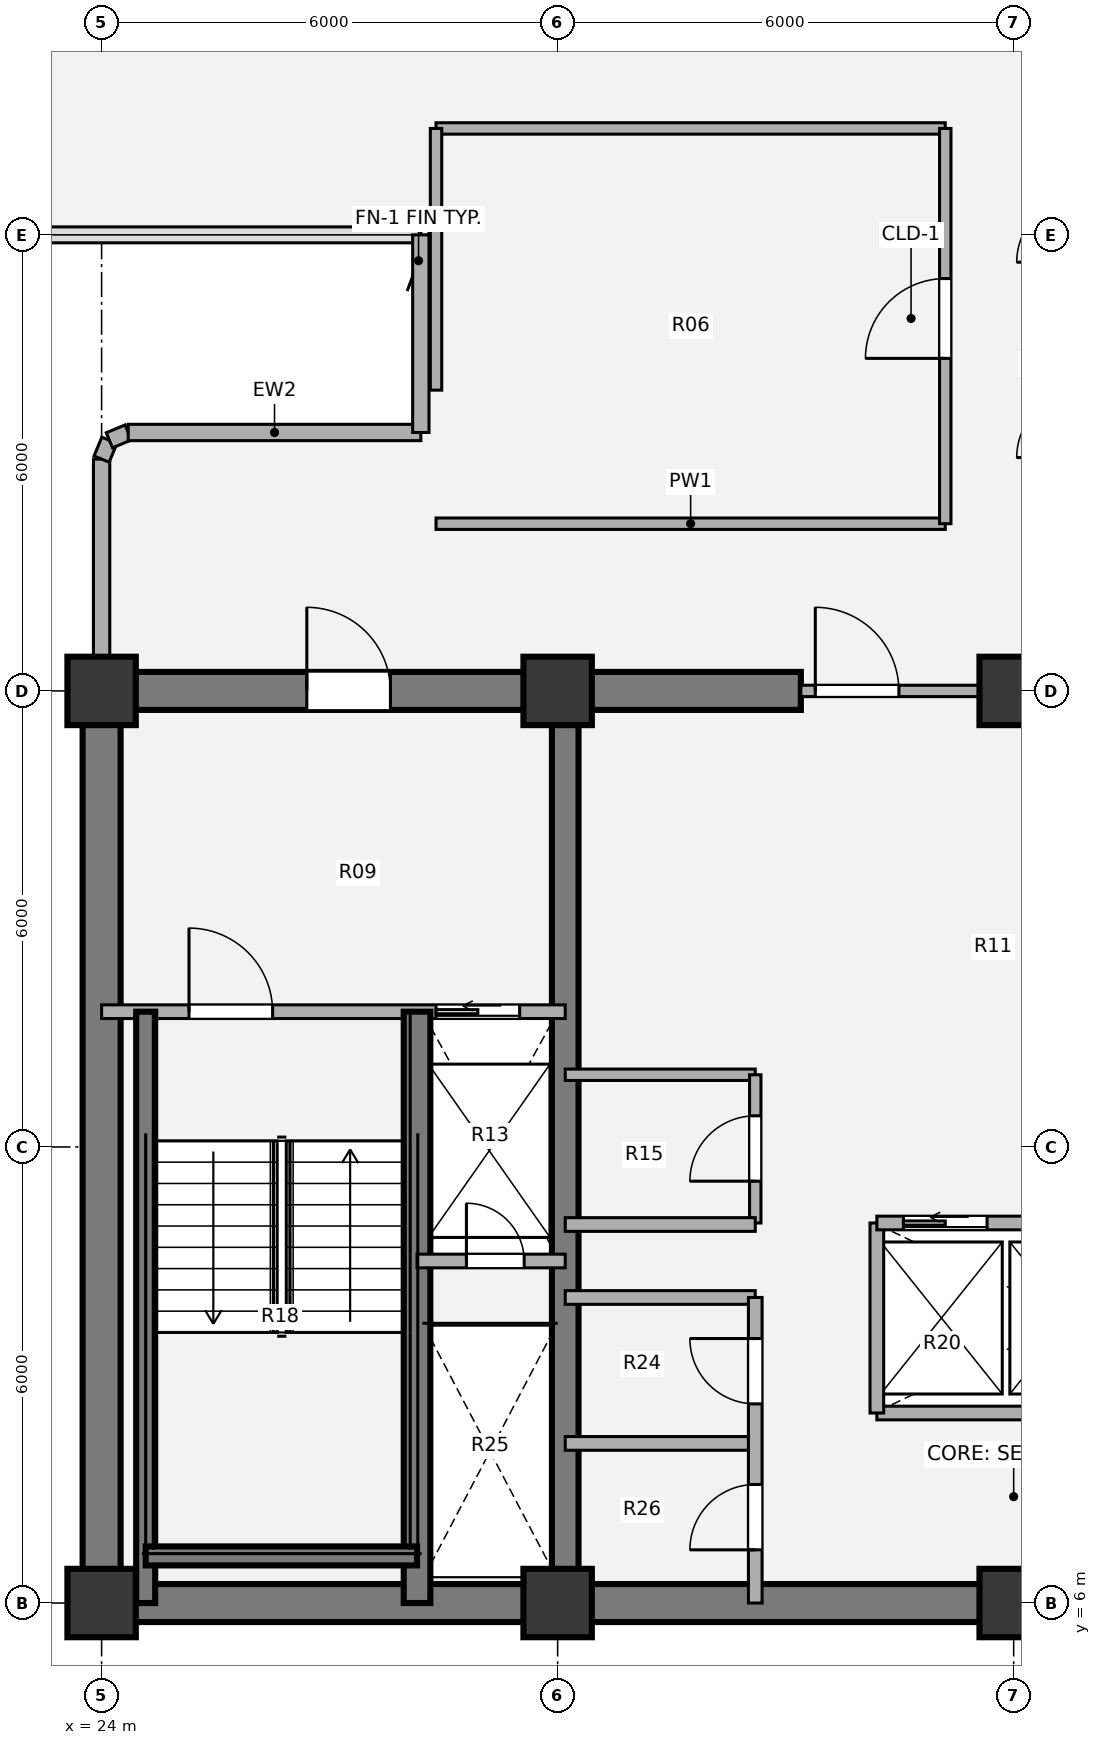
"""IFC4 building model, lengths in metres.
Left out: names, types, materials, properties, quantities, classifications, styles, units other than length and angle.
Written with IfcOpenShell. Run it as: python <this file> out.ifc"""

import sys

from ifc_helpers import new_model, si_unit, direction, frame, frame_2d, origin, origin_2d, place, context, subcontext, project, spatial, rectangle, extrude, source, transform, mapped, element, fill, save


model = new_model("IFC4")
c1 = context("Model", 3, precision=1e-05, world=origin(), true_north=direction((0.0, 1.0)))
c2 = subcontext(c1, "Body", "Model", "MODEL_VIEW")
j1 = project(units=[si_unit("LENGTHUNIT", "METRE"), si_unit("PLANEANGLEUNIT", "RADIAN")], contexts=[c1])
p1 = place(None, origin())
s1 = spatial("IfcSite", under=j1, at=p1, CompositionType="ELEMENT")
p2 = place(p1, origin())
s2 = spatial("IfcBuilding", under=s1, at=p2, CompositionType="ELEMENT")
p3 = place(p2, frame((0.0, 0.0, 120.06)))
s3 = spatial("IfcBuildingStorey", under=s2, at=p3, CompositionType="ELEMENT", Elevation=120.06)
m1 = source(origin(), c2, "Body", "SweptSolid", [
    extrude(rectangle(XDim=0.9, YDim=0.9, at=origin_2d()), origin(), (0.0, 0.0, 1.0), 3.78),
])
for number, where, z_axis, x_axis in (
    (1, (24.0, 6.0, 0.0), (0.0, 0.0, 1.0), (1.0, 0.0, 0.0)),
    (2, (30.0, 6.0, 0.0), (0.0, 0.0, 1.0), (1.0, 0.0, 0.0)),
    (3, (36.0, 6.0, 0.0), (0.0, 0.0, 1.0), (1.0, 0.0, 0.0)),
    (4, (24.0, 18.0, 0.0), (0.0, 0.0, 1.0), (1.0, 0.0, 0.0)),
    (5, (30.0, 18.0, 0.0), (0.0, 0.0, 1.0), (1.0, 0.0, 0.0)),
    (6, (36.0, 18.0, 0.0), (0.0, 0.0, 1.0), (1.0, 0.0, 0.0)),
):
    element("IfcColumn", number, at=place(p3, frame(where, z_axis=z_axis, x_axis=x_axis)), inside=s3, PredefinedType="COLUMN", context=c2, shape_type="MappedRepresentation", body=[
        mapped(m1, transform((0.0, 0.0, 0.0), x_axis=(1.0, 0.0, 0.0), y_axis=(0.0, 1.0, 0.0), z_axis=(0.0, 0.0, 1.0), scale=1.0)),
    ])
p4 = place(p3, frame((48.25, 6.0, 0.0), z_axis=(0.0, 0.0, 1.0), x_axis=(-1.0, 0.0, 0.0)))
e7 = element("IfcWall", 7, at=p4, inside=s3, PredefinedType="SHEAR", context=c2, shape_type="SweptSolid", body=[
    extrude(rectangle(XDim=24.5, YDim=0.5, at=frame_2d((12.25, 0.0))), origin(), (0.0, 0.0, 1.0), 3.78),
])
p5 = place(p3, frame((24.0, 6.0, 0.0), z_axis=(0.0, 0.0, 1.0), x_axis=(0.0, 1.0, 0.0)))
e8 = element("IfcWall", 8, at=p5, inside=s3, PredefinedType="SHEAR", context=c2, shape_type="SweptSolid", body=[
    extrude(rectangle(XDim=12.0, YDim=0.5, at=frame_2d((6.0, 0.0))), origin(), (0.0, 0.0, 1.0), 3.78),
])
p6 = place(p3, frame((23.75, 18.0, 0.0), z_axis=(0.0, 0.0, 1.0), x_axis=(1.0, 0.0, 0.0)))
e9 = element("IfcWall", 9, at=p6, inside=s3, PredefinedType="SHEAR", context=c2, shape_type="SweptSolid", body=[
    extrude(rectangle(XDim=9.45, YDim=0.5, at=frame_2d((4.725, 0.0))), origin(), (0.0, 0.0, 1.0), 3.78),
])
p7 = place(p6, frame((2.95, 0.0, 0.0)))
e10 = element("IfcOpeningElement", 10, at=p7, cuts=e9, PredefinedType="OPENING", context=c2, shape_type="SweptSolid", body=[
    extrude(rectangle(XDim=1.1, YDim=2.1, at=origin_2d()), frame((0.55, 0.26, 1.05), z_axis=(0.0, -1.0, 0.0), x_axis=(1.0, 0.0, 0.0)), (0.0, 0.0, 1.0), 0.52),
])
p8 = place(p3, frame((30.1, 6.0, 0.0), z_axis=(0.0, 0.0, 1.0), x_axis=(0.0, 1.0, 0.0)))
e11 = element("IfcWall", 11, at=p8, inside=s3, PredefinedType="SHEAR", context=c2, shape_type="SweptSolid", body=[
    extrude(rectangle(XDim=12.0, YDim=0.35, at=frame_2d((6.0, 0.0))), origin(), (0.0, 0.0, 1.0), 3.78),
])
p9 = place(p3, frame((24.0, 18.43, 0.0), z_axis=(0.0, 0.0, 1.0), x_axis=(0.0, 1.0, 0.0)))
e12 = element("IfcWall", 12, at=p9, inside=s3, PredefinedType="SOLIDWALL", context=c2, shape_type="SweptSolid", body=[
    extrude(rectangle(XDim=2.62, YDim=0.215, at=frame_2d((1.31, 0.0))), origin(), (0.0, 0.0, 1.0), 3.53),
])
p10 = place(p3, frame((24.0, 21.05, 0.0), z_axis=(0.0, 0.0, 1.0), x_axis=(0.382673670509, 0.923883575944, 0.0)))
e13 = element("IfcWall", 13, at=p10, inside=s3, PredefinedType="SOLIDWALL", context=c2, shape_type="SweptSolid", body=[
    extrude(rectangle(XDim=0.268, YDim=0.215, at=frame_2d((0.134, 0.0))), origin(), (0.0, 0.0, 1.0), 3.53),
])
p11 = place(p3, frame((24.103, 21.298, 0.0), z_axis=(0.0, 0.0, 1.0), x_axis=(0.924205486139, 0.381895560841, 0.0)))
e14 = element("IfcWall", 14, at=p11, inside=s3, PredefinedType="SOLIDWALL", context=c2, shape_type="SweptSolid", body=[
    extrude(rectangle(XDim=0.268, YDim=0.215, at=frame_2d((0.134, 0.0))), origin(), (0.0, 0.0, 1.0), 3.53),
])
p12 = place(p3, frame((24.35, 21.4, 0.0), z_axis=(0.0, 0.0, 1.0), x_axis=(1.0, 0.0, 0.0)))
e15 = element("IfcWall", 15, at=p12, inside=s3, PredefinedType="SOLIDWALL", context=c2, shape_type="SweptSolid", body=[
    extrude(rectangle(XDim=3.85, YDim=0.215, at=frame_2d((1.925, 0.0))), origin(), (0.0, 0.0, 1.0), 3.53),
])
p13 = place(p3, frame((28.2, 21.4, 0.0), z_axis=(0.0, 0.0, 1.0), x_axis=(0.0, 1.0, 0.0)))
e16 = element("IfcWall", 16, at=p13, inside=s3, PredefinedType="SOLIDWALL", context=c2, shape_type="SweptSolid", body=[
    extrude(rectangle(XDim=2.6, YDim=0.215, at=frame_2d((1.3, 0.0))), origin(), (0.0, 0.0, 1.0), 3.53),
])
p14 = place(p3, frame((30.1, 12.95, 0.0), z_axis=(0.0, 0.0, 1.0), x_axis=(1.0, 0.0, 0.0)))
e17 = element("IfcWall", 17, at=p14, inside=s3, PredefinedType="PARTITIONING", context=c2, shape_type="SweptSolid", body=[
    extrude(rectangle(XDim=2.5, YDim=0.15, at=frame_2d((1.25, 0.0))), origin(), (0.0, 0.0, 1.0), 3.5),
])
p15 = place(p3, frame((32.6, 11.0, 0.0), z_axis=(0.0, 0.0, 1.0), x_axis=(0.0, 1.0, 0.0)))
e18 = element("IfcWall", 18, at=p15, inside=s3, PredefinedType="PARTITIONING", context=c2, shape_type="SweptSolid", body=[
    extrude(rectangle(XDim=1.95, YDim=0.15, at=frame_2d((0.975, 0.0))), origin(), (0.0, 0.0, 1.0), 3.5),
])
p16 = place(p15, frame((0.55, 0.0, 0.0)))
e19 = element("IfcOpeningElement", 19, at=p16, cuts=e18, PredefinedType="OPENING", context=c2, shape_type="SweptSolid", body=[
    extrude(rectangle(XDim=0.86, YDim=2.1, at=origin_2d()), frame((0.43, 0.085, 1.05), z_axis=(0.0, -1.0, 0.0), x_axis=(1.0, 0.0, 0.0)), (0.0, 0.0, 1.0), 0.17),
])
p17 = place(p3, frame((34.2, 8.5, 0.0), z_axis=(0.0, 0.0, 1.0), x_axis=(1.0, 0.0, 0.0)))
e20 = element("IfcWall", 20, at=p17, inside=s3, PredefinedType="PARTITIONING", context=c2, shape_type="SweptSolid", body=[
    extrude(rectangle(XDim=5.15, YDim=0.18, at=frame_2d((2.575, 0.0))), origin(), (0.0, 0.0, 1.0), 3.5),
])
for number, where, z_axis, x_axis in (
    (21, (34.2, 8.5, 0.0), (0.0, 0.0, 1.0), (0.0, 1.0, 0.0)),
    (22, (30.1, 10.98, 0.0), (0.0, 0.0, 1.0), (1.0, 0.0, 0.0)),
    (23, (30.1, 8.1, 0.0), (0.0, 0.0, 1.0), (1.0, 0.0, 0.0)),
    (24, (30.1, 10.02, 0.0), (0.0, 0.0, 1.0), (1.0, 0.0, 0.0)),
):
    element("IfcWall", number, at=place(p3, frame(where, z_axis=z_axis, x_axis=x_axis)), inside=s3, PredefinedType="PARTITIONING", context=c2, shape_type="SweptSolid", body=[
        extrude(rectangle(XDim=2.5, YDim=0.18, at=frame_2d((1.25, 0.0))), origin(), (0.0, 0.0, 1.0), 3.5),
    ])
p18 = place(p3, frame((32.6, 6.0, 0.0), z_axis=(0.0, 0.0, 1.0), x_axis=(0.0, 1.0, 0.0)))
e25 = element("IfcWall", 25, at=p18, inside=s3, PredefinedType="PARTITIONING", context=c2, shape_type="SweptSolid", body=[
    extrude(rectangle(XDim=4.02, YDim=0.18, at=frame_2d((2.01, 0.0))), origin(), (0.0, 0.0, 1.0), 3.5),
])
p19 = place(p18, frame((0.7, 0.0, 0.0)))
e26 = element("IfcOpeningElement", 26, at=p19, cuts=e25, PredefinedType="OPENING", context=c2, shape_type="SweptSolid", body=[
    extrude(rectangle(XDim=0.86, YDim=2.1, at=origin_2d()), frame((0.43, 0.1, 1.05), z_axis=(0.0, -1.0, 0.0), x_axis=(1.0, 0.0, 0.0)), (0.0, 0.0, 1.0), 0.2),
])
p20 = place(p18, frame((2.62, 0.0, 0.0)))
e27 = element("IfcOpeningElement", 27, at=p20, cuts=e25, PredefinedType="OPENING", context=c2, shape_type="SweptSolid", body=[
    extrude(rectangle(XDim=0.86, YDim=2.1, at=origin_2d()), frame((0.43, 0.1, 1.05), z_axis=(0.0, -1.0, 0.0), x_axis=(1.0, 0.0, 0.0)), (0.0, 0.0, 1.0), 0.2),
])
p21 = place(p3, frame((33.2, 18.0, 0.0), z_axis=(0.0, 0.0, 1.0), x_axis=(1.0, 0.0, 0.0)))
e28 = element("IfcWall", 28, at=p21, inside=s3, PredefinedType="PARTITIONING", context=c2, shape_type="SweptSolid", body=[
    extrude(rectangle(XDim=5.6, YDim=0.15, at=frame_2d((2.8, 0.0))), origin(), (0.0, 0.0, 1.0), 2.315),
])
p22 = place(p21, frame((0.19, 0.0, 0.0)))
e29 = element("IfcOpeningElement", 29, at=p22, cuts=e28, PredefinedType="OPENING", context=c2, shape_type="SweptSolid", body=[
    extrude(rectangle(XDim=1.1, YDim=2.1, at=origin_2d()), frame((0.55, 0.085, 1.05), z_axis=(0.0, -1.0, 0.0), x_axis=(1.0, 0.0, 0.0)), (0.0, 0.0, 1.0), 0.17),
])
p23 = place(p21, frame((4.31, 0.0, 0.0)))
e30 = element("IfcOpeningElement", 30, at=p23, cuts=e28, PredefinedType="OPENING", context=c2, shape_type="SweptSolid", body=[
    extrude(rectangle(XDim=1.1, YDim=2.1, at=origin_2d()), frame((0.55, 0.085, 1.05), z_axis=(0.0, -1.0, 0.0), x_axis=(1.0, 0.0, 0.0)), (0.0, 0.0, 1.0), 0.17),
])
p24 = place(p3, frame((24.0, 13.78, 0.0), z_axis=(0.0, 0.0, 1.0), x_axis=(1.0, 0.0, 0.0)))
e31 = element("IfcWall", 31, at=p24, inside=s3, PredefinedType="PARTITIONING", context=c2, shape_type="SweptSolid", body=[
    extrude(rectangle(XDim=6.1, YDim=0.18, at=frame_2d((3.05, 0.0))), origin(), (0.0, 0.0, 1.0), 3.5),
])
p25 = place(p24, frame((1.15, 0.0, 0.0)))
e32 = element("IfcOpeningElement", 32, at=p25, cuts=e31, PredefinedType="OPENING", context=c2, shape_type="SweptSolid", body=[
    extrude(rectangle(XDim=1.1, YDim=2.1, at=origin_2d()), frame((0.55, 0.1, 1.05), z_axis=(0.0, -1.0, 0.0), x_axis=(1.0, 0.0, 0.0)), (0.0, 0.0, 1.0), 0.2),
])
p26 = place(p24, frame((4.4, 0.0, 0.0)))
e33 = element("IfcOpeningElement", 33, at=p26, cuts=e31, PredefinedType="OPENING", context=c2, shape_type="SweptSolid", body=[
    extrude(rectangle(XDim=1.1, YDim=2.1, at=origin_2d()), frame((0.55, 0.1, 1.05), z_axis=(0.0, -1.0, 0.0), x_axis=(1.0, 0.0, 0.0)), (0.0, 0.0, 1.0), 0.2),
])
p27 = place(p3, frame((28.15, 6.0, 0.0), z_axis=(0.0, 0.0, 1.0), x_axis=(0.0, 1.0, 0.0)))
e34 = element("IfcWall", 34, at=p27, inside=s3, PredefinedType="SHEAR", context=c2, shape_type="SweptSolid", body=[
    extrude(rectangle(XDim=7.78, YDim=0.35, at=frame_2d((3.89, 0.0))), origin(), (0.0, 0.0, 1.0), 3.85),
])
p28 = place(p3, frame((24.58, 6.0, 0.0), z_axis=(0.0, 0.0, 1.0), x_axis=(0.0, 1.0, 0.0)))
e35 = element("IfcWall", 35, at=p28, inside=s3, PredefinedType="SHEAR", context=c2, shape_type="SweptSolid", body=[
    extrude(rectangle(XDim=7.78, YDim=0.25, at=frame_2d((3.89, 0.0))), origin(), (0.0, 0.0, 1.0), 3.85),
])
p29 = place(p3, frame((24.58, 6.62, 0.0), z_axis=(0.0, 0.0, 1.0), x_axis=(1.0, 0.0, 0.0)))
e36 = element("IfcWall", 36, at=p29, inside=s3, PredefinedType="SHEAR", context=c2, shape_type="SweptSolid", body=[
    extrude(rectangle(XDim=3.57, YDim=0.25, at=frame_2d((1.785, 0.0))), origin(), (0.0, 0.0, 1.0), 3.85),
])
p30 = place(p3, frame((28.15, 10.5, 0.0), z_axis=(0.0, 0.0, 1.0), x_axis=(1.0, 0.0, 0.0)))
e37 = element("IfcWall", 37, at=p30, inside=s3, PredefinedType="PARTITIONING", context=c2, shape_type="SweptSolid", body=[
    extrude(rectangle(XDim=1.95, YDim=0.18, at=frame_2d((0.975, 0.0))), origin(), (0.0, 0.0, 1.0), 3.5),
])
p31 = place(p30, frame((0.65, 0.0, 0.0)))
e38 = element("IfcOpeningElement", 38, at=p31, cuts=e37, PredefinedType="OPENING", context=c2, shape_type="SweptSolid", body=[
    extrude(rectangle(XDim=0.76, YDim=2.05, at=origin_2d()), frame((0.38, 0.1, 1.025), z_axis=(0.0, -1.0, 0.0), x_axis=(1.0, 0.0, 0.0)), (0.0, 0.0, 1.0), 0.2),
])
p32 = place(p3, frame((34.2, 11.0, 0.0), z_axis=(0.0, 0.0, 1.0), x_axis=(1.0, 0.0, 0.0)))
e39 = element("IfcWall", 39, at=p32, inside=s3, PredefinedType="PARTITIONING", context=c2, shape_type="SweptSolid", body=[
    extrude(rectangle(XDim=5.15, YDim=0.18, at=frame_2d((2.575, 0.0))), origin(), (0.0, 0.0, 1.0), 3.5),
])
p33 = place(p32, frame((0.35, 0.0, 0.0)))
e40 = element("IfcOpeningElement", 40, at=p33, cuts=e39, PredefinedType="OPENING", context=c2, shape_type="SweptSolid", body=[
    extrude(rectangle(XDim=1.1, YDim=2.1, at=origin_2d()), frame((0.55, 0.1, 1.05), z_axis=(0.0, -1.0, 0.0), x_axis=(1.0, 0.0, 0.0)), (0.0, 0.0, 1.0), 0.2),
])
p34 = place(p32, frame((2.05, 0.0, 0.0)))
e41 = element("IfcOpeningElement", 41, at=p34, cuts=e39, PredefinedType="OPENING", context=c2, shape_type="SweptSolid", body=[
    extrude(rectangle(XDim=1.1, YDim=2.1, at=origin_2d()), frame((0.55, 0.1, 1.05), z_axis=(0.0, -1.0, 0.0), x_axis=(1.0, 0.0, 0.0)), (0.0, 0.0, 1.0), 0.2),
])
p35 = place(p32, frame((3.7, 0.0, 0.0)))
e42 = element("IfcOpeningElement", 42, at=p35, cuts=e39, PredefinedType="OPENING", context=c2, shape_type="SweptSolid", body=[
    extrude(rectangle(XDim=1.1, YDim=2.1, at=origin_2d()), frame((0.55, 0.1, 1.05), z_axis=(0.0, -1.0, 0.0), x_axis=(1.0, 0.0, 0.0)), (0.0, 0.0, 1.0), 0.2),
])
for number, where, z_axis, x_axis in (
    (43, (28.4, 20.2, 0.0), (0.0, 0.0, 1.0), (1.0, 0.0, 0.0)),
    (44, (28.4, 25.4, 0.0), (0.0, 0.0, 1.0), (1.0, 0.0, 0.0)),
):
    element("IfcWall", number, at=place(p3, frame(where, z_axis=z_axis, x_axis=x_axis)), inside=s3, PredefinedType="PARTITIONING", context=c2, shape_type="SweptSolid", body=[
        extrude(rectangle(XDim=6.7, YDim=0.15, at=frame_2d((3.35, 0.0))), origin(), (0.0, 0.0, 1.0), 3.5),
    ])
p36 = place(p3, frame((28.4, 21.957, 0.0), z_axis=(0.0, 0.0, 1.0), x_axis=(0.0, 1.0, 0.0)))
e45 = element("IfcWall", 45, at=p36, inside=s3, PredefinedType="PARTITIONING", context=c2, shape_type="SweptSolid", body=[
    extrude(rectangle(XDim=3.443, YDim=0.15, at=frame_2d((1.721, 0.0))), origin(), (0.0, 0.0, 1.0), 3.5),
])
p37 = place(p3, frame((35.1, 20.2, 0.0), z_axis=(0.0, 0.0, 1.0), x_axis=(0.0, 1.0, 0.0)))
e46 = element("IfcWall", 46, at=p37, inside=s3, PredefinedType="PARTITIONING", context=c2, shape_type="SweptSolid", body=[
    extrude(rectangle(XDim=5.2, YDim=0.15, at=frame_2d((2.6, 0.0))), origin(), (0.0, 0.0, 1.0), 3.5),
])
p38 = place(p37, frame((2.175, 0.0, 0.0)))
e47 = element("IfcOpeningElement", 47, at=p38, cuts=e46, PredefinedType="OPENING", context=c2, shape_type="SweptSolid", body=[
    extrude(rectangle(XDim=1.05, YDim=2.1, at=origin_2d()), frame((0.525, 0.085, 1.05), z_axis=(0.0, -1.0, 0.0), x_axis=(1.0, 0.0, 0.0)), (0.0, 0.0, 1.0), 0.17),
])
m2 = source(origin(), c2, "Body", "SweptSolid", [
    extrude(rectangle(XDim=0.86, YDim=2.1, at=origin_2d()), frame((0.43, 0.025, 1.05), z_axis=(0.0, -1.0, 0.0), x_axis=(1.0, 0.0, 0.0)), (0.0, 0.0, 1.0), 0.05),
])
p39 = place(p16, origin())
e48 = element("IfcDoor", 48, at=p39, inside=s3, OperationType="SINGLE_SWING_LEFT", PredefinedType="DOOR", context=c2, shape_type="MappedRepresentation", body=[
    mapped(m2, transform((0.0, 0.0, 0.0), x_axis=(1.0, 0.0, 0.0), y_axis=(0.0, 1.0, 0.0), z_axis=(0.0, 0.0, 1.0), scale=1.0)),
])
fill(e19, e48)
p40 = place(p19, origin())
e49 = element("IfcDoor", 49, at=p40, inside=s3, OperationType="SINGLE_SWING_LEFT", PredefinedType="DOOR", context=c2, shape_type="MappedRepresentation", body=[
    mapped(m2, transform((0.0, 0.0, 0.0), x_axis=(1.0, 0.0, 0.0), y_axis=(0.0, 1.0, 0.0), z_axis=(0.0, 0.0, 1.0), scale=1.0)),
])
fill(e26, e49)
p41 = place(p20, origin())
e50 = element("IfcDoor", 50, at=p41, inside=s3, OperationType="SINGLE_SWING_RIGHT", PredefinedType="DOOR", context=c2, shape_type="MappedRepresentation", body=[
    mapped(m2, transform((0.0, 0.0, 0.0), x_axis=(1.0, 0.0, 0.0), y_axis=(0.0, 1.0, 0.0), z_axis=(0.0, 0.0, 1.0), scale=1.0)),
])
fill(e27, e50)
m3 = source(origin(), c2, "Body", "SweptSolid", [
    extrude(rectangle(XDim=1.1, YDim=2.1, at=origin_2d()), frame((0.55, 0.025, 1.05), z_axis=(0.0, -1.0, 0.0), x_axis=(1.0, 0.0, 0.0)), (0.0, 0.0, 1.0), 0.05),
])
p42 = place(p22, origin())
e51 = element("IfcDoor", 51, at=p42, inside=s3, OperationType="SINGLE_SWING_LEFT", PredefinedType="DOOR", context=c2, shape_type="MappedRepresentation", body=[
    mapped(m3, transform((0.0, 0.0, 0.0), x_axis=(1.0, 0.0, 0.0), y_axis=(0.0, 1.0, 0.0), z_axis=(0.0, 0.0, 1.0), scale=1.0)),
])
fill(e29, e51)
m4 = source(origin(), c2, "Body", "SweptSolid", [
    extrude(rectangle(XDim=1.1, YDim=2.1, at=origin_2d()), frame((0.55, 0.025, 1.05), z_axis=(0.0, -1.0, 0.0), x_axis=(1.0, 0.0, 0.0)), (0.0, 0.0, 1.0), 0.05),
])
p43 = place(p25, origin())
e52 = element("IfcDoor", 52, at=p43, inside=s3, OperationType="SINGLE_SWING_LEFT", PredefinedType="DOOR", context=c2, shape_type="MappedRepresentation", body=[
    mapped(m4, transform((0.0, 0.0, 0.0), x_axis=(1.0, 0.0, 0.0), y_axis=(0.0, 1.0, 0.0), z_axis=(0.0, 0.0, 1.0), scale=1.0)),
])
fill(e32, e52)
m5 = source(origin(), c2, "Body", "SweptSolid", [
    extrude(rectangle(XDim=1.1, YDim=2.1, at=origin_2d()), frame((0.55, 0.025, 1.05), z_axis=(0.0, -1.0, 0.0), x_axis=(1.0, 0.0, 0.0)), (0.0, 0.0, 1.0), 0.05),
])
p44 = place(p26, origin())
e53 = element("IfcDoor", 53, at=p44, inside=s3, OperationType="SLIDING_TO_LEFT", PredefinedType="DOOR", context=c2, shape_type="MappedRepresentation", body=[
    mapped(m5, transform((0.0, 0.0, 0.0), x_axis=(1.0, 0.0, 0.0), y_axis=(0.0, 1.0, 0.0), z_axis=(0.0, 0.0, 1.0), scale=1.0)),
])
fill(e33, e53)
m6 = source(origin(), c2, "Body", "SweptSolid", [
    extrude(rectangle(XDim=0.76, YDim=2.05, at=origin_2d()), frame((0.38, 0.025, 1.025), z_axis=(0.0, -1.0, 0.0), x_axis=(1.0, 0.0, 0.0)), (0.0, 0.0, 1.0), 0.05),
])
p45 = place(p31, origin())
e54 = element("IfcDoor", 54, at=p45, inside=s3, OperationType="SINGLE_SWING_LEFT", PredefinedType="DOOR", context=c2, shape_type="MappedRepresentation", body=[
    mapped(m6, transform((0.0, 0.0, 0.0), x_axis=(1.0, 0.0, 0.0), y_axis=(0.0, 1.0, 0.0), z_axis=(0.0, 0.0, 1.0), scale=1.0)),
])
fill(e38, e54)
p46 = place(p7, origin())
e55 = element("IfcDoor", 55, at=p46, inside=s3, OperationType="SINGLE_SWING_LEFT", PredefinedType="DOOR", context=c2, shape_type="MappedRepresentation", body=[
    mapped(m3, transform((0.0, 0.0, 0.0), x_axis=(1.0, 0.0, 0.0), y_axis=(0.0, 1.0, 0.0), z_axis=(0.0, 0.0, 1.0), scale=1.0)),
])
fill(e10, e55)
p47 = place(p33, origin())
e56 = element("IfcDoor", 56, at=p47, inside=s3, OperationType="SLIDING_TO_LEFT", PredefinedType="DOOR", context=c2, shape_type="MappedRepresentation", body=[
    mapped(m5, transform((0.0, 0.0, 0.0), x_axis=(1.0, 0.0, 0.0), y_axis=(0.0, 1.0, 0.0), z_axis=(0.0, 0.0, 1.0), scale=1.0)),
])
fill(e40, e56)
m7 = source(origin(), c2, "Body", "SweptSolid", [
    extrude(rectangle(XDim=1.05, YDim=2.1, at=origin_2d()), frame((0.525, 0.025, 1.05), z_axis=(0.0, -1.0, 0.0), x_axis=(1.0, 0.0, 0.0)), (0.0, 0.0, 1.0), 0.05),
])
p48 = place(p38, origin())
e57 = element("IfcDoor", 57, at=p48, inside=s3, OperationType="SINGLE_SWING_LEFT", PredefinedType="DOOR", context=c2, shape_type="MappedRepresentation", body=[
    mapped(m7, transform((0.0, 0.0, 0.0), x_axis=(1.0, 0.0, 0.0), y_axis=(0.0, 1.0, 0.0), z_axis=(0.0, 0.0, 1.0), scale=1.0)),
])
fill(e47, e57)
save(model, sys.argv[1])
